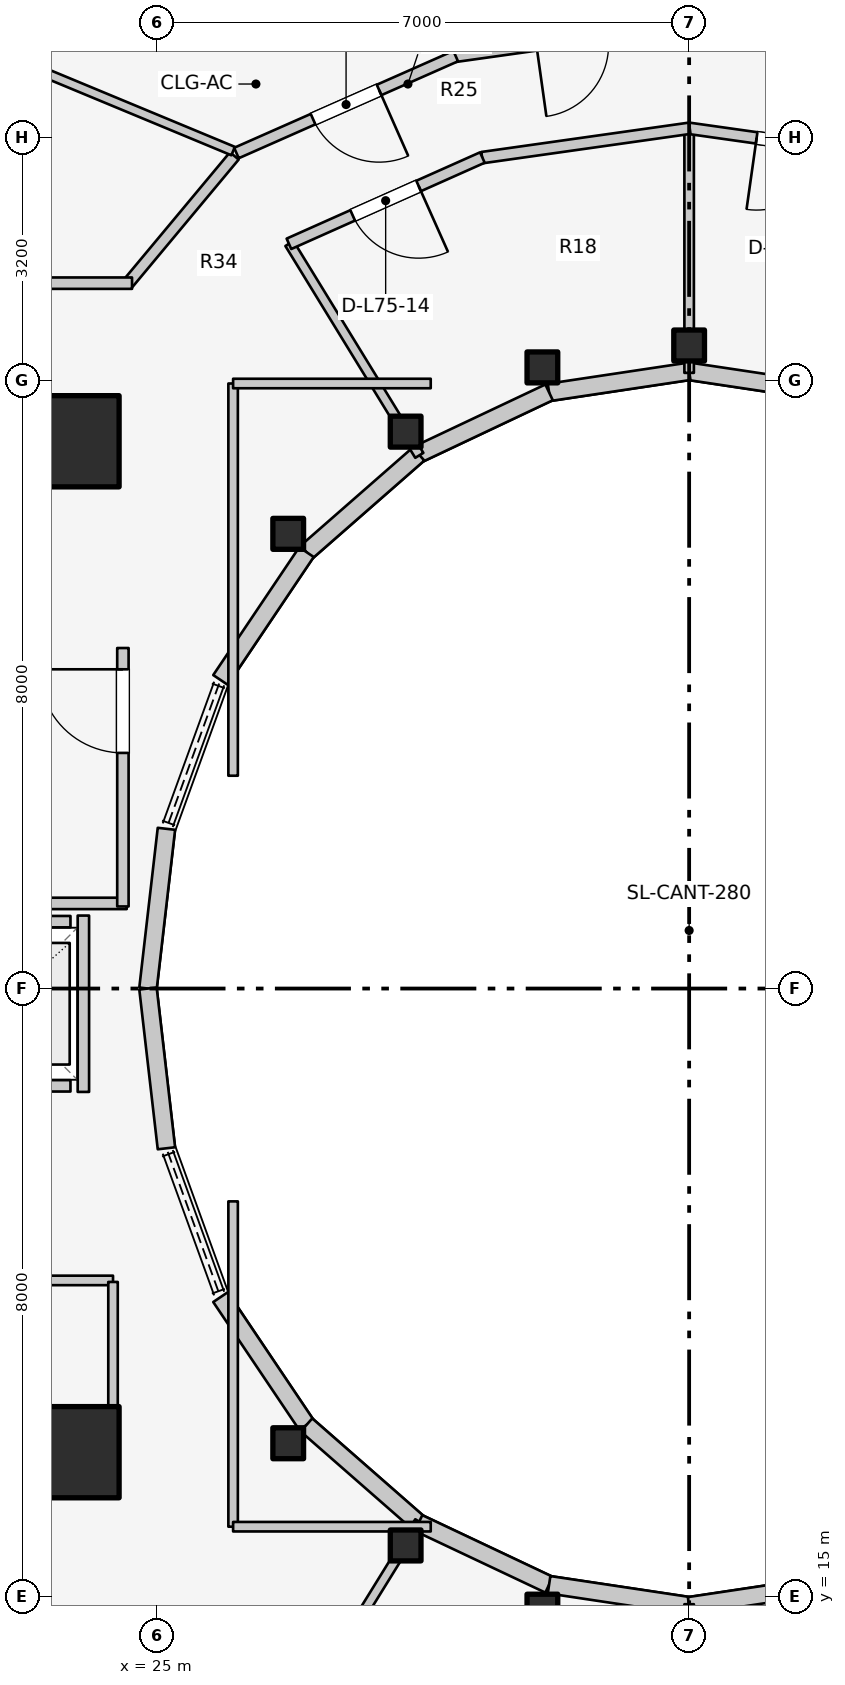
"""IFC4 building model, lengths in metres.
Left out: names, types, materials, properties, quantities, classifications, styles, units other than length and angle.
Written with IfcOpenShell. Run it as: python <this file> out.ifc"""

import sys

from ifc_helpers import new_model, si_unit, direction, frame, frame_2d, origin, origin_2d, place, context, subcontext, project, spatial, rectangle, i_section, extrude, element, fill, save


model = new_model("IFC4")
c1 = context("Model", 3, precision=1e-05, world=origin(), true_north=direction((0.0, 1.0)))
c2 = subcontext(c1, "Body", "Model", "MODEL_VIEW")
j1 = project(units=[si_unit("LENGTHUNIT", "METRE"), si_unit("PLANEANGLEUNIT", "RADIAN")], contexts=[c1])
p1 = place(None, origin())
s1 = spatial("IfcSite", under=j1, at=p1, CompositionType="ELEMENT")
p2 = place(p1, origin())
s2 = spatial("IfcBuilding", under=s1, at=p2, CompositionType="ELEMENT")
p3 = place(p2, frame((0.0, 0.0, 246.0)))
s3 = spatial("IfcBuildingStorey", under=s2, at=p3, CompositionType="ELEMENT", Elevation=246.0)
for number, where, z_axis, x_axis in (
    (1, (19.65, 16.55, 0.0), (0.0, 0.0, 1.0), (1.0, 0.0, 0.0)),
    (2, (19.65, 30.35, 0.0), (0.0, 0.0, 1.0), (1.0, 0.0, 0.0)),
):
    element("IfcWall", number, at=place(p3, frame(where, z_axis=z_axis, x_axis=x_axis)), inside=s3, PredefinedType="SHEAR", context=c2, shape_type="SweptSolid", body=[
        extrude(rectangle(XDim=4.5, YDim=0.45, at=frame_2d((2.25, 0.0))), origin(), (0.0, 0.0, 1.0), 3.6),
    ])
for number, where, z_axis, x_axis in (
    (3, (23.9, 16.9, 0.0), (0.0, 0.0, 1.0), (1.0, 0.0, 0.0)),
    (4, (23.9, 30.2, 0.0), (0.0, 0.0, 1.0), (1.0, 0.0, 0.0)),
):
    element("IfcColumn", number, at=place(p3, frame(where, z_axis=z_axis, x_axis=x_axis)), inside=s3, PredefinedType="COLUMN", context=c2, shape_type="SweptSolid", body=[
        extrude(rectangle(XDim=1.2, YDim=1.2, at=origin_2d()), origin(), (0.0, 0.0, 1.0), 3.6),
    ])
for number, where, z_axis, x_axis in (
    (5, (32.0, 31.46, 0.0), (0.0, 0.0, 1.0), (1.0, 0.0, 0.0)),
    (6, (30.069, 31.172, 0.0), (0.0, 0.0, 1.0), (1.0, 0.0, 0.0)),
    (7, (28.27, 30.327, 0.0), (0.0, 0.0, 1.0), (1.0, 0.0, 0.0)),
    (8, (26.725, 28.982, 0.0), (0.0, 0.0, 1.0), (1.0, 0.0, 0.0)),
    (9, (26.725, 17.018, 0.0), (0.0, 0.0, 1.0), (1.0, 0.0, 0.0)),
    (10, (28.27, 15.673, 0.0), (0.0, 0.0, 1.0), (1.0, 0.0, 0.0)),
    (11, (30.069, 14.828, 0.0), (0.0, 0.0, 1.0), (1.0, 0.0, 0.0)),
):
    element("IfcColumn", number, at=place(p3, frame(where, z_axis=z_axis, x_axis=x_axis)), inside=s3, PredefinedType="COLUMN", context=c2, shape_type="SweptSolid", body=[
        extrude(i_section(OverallWidth=0.404, OverallDepth=0.407, WebThickness=0.027, FlangeThickness=0.044, FilletRadius=0.025, at=origin_2d()), origin(), (0.0, 0.0, 1.0), 3.6),
    ])
for number, where, z_axis, x_axis in (
    (12, (33.843, 30.843, 0.0), (0.0, 0.0, 1.0), (-0.989, 0.149, 0.0)),
    (13, (32.0, 31.12, 0.0), (0.0, 0.0, 1.0), (-0.989, -0.149, 0.0)),
):
    element("IfcWall", number, at=place(p3, frame(where, z_axis=z_axis, x_axis=x_axis)), inside=s3, PredefinedType="STANDARD", context=c2, shape_type="SweptSolid", body=[
        extrude(rectangle(XDim=1.864, YDim=0.23, at=frame_2d((0.932, 0.0))), origin(), (0.0, 0.0, 1.0), 2.6),
    ])
p4 = place(p3, frame((30.157, 30.843, 0.0), z_axis=(0.0, 0.0, 1.0), x_axis=(-0.904179699603, -0.427152280606, 0.0)))
e14 = element("IfcWall", 14, at=p4, inside=s3, PredefinedType="STANDARD", context=c2, shape_type="SweptSolid", body=[
    extrude(rectangle(XDim=1.899, YDim=0.23, at=frame_2d((0.95, 0.0))), origin(), (0.0, 0.0, 1.0), 2.6),
])
p5 = place(p3, frame((28.44, 30.032, 0.0), z_axis=(0.0, 0.0, 1.0), x_axis=(-0.752576694707, -0.658504607869, 0.0)))
e15 = element("IfcWall", 15, at=p5, inside=s3, PredefinedType="STANDARD", context=c2, shape_type="SweptSolid", body=[
    extrude(rectangle(XDim=1.959, YDim=0.23, at=frame_2d((0.98, 0.0))), origin(), (0.0, 0.0, 1.0), 2.6),
])
p6 = place(p3, frame((26.965, 28.742, 0.0), z_axis=(0.0, 0.0, 1.0), x_axis=(-0.558197800898, -0.829707909492, 0.0)))
e16 = element("IfcWall", 16, at=p6, inside=s3, PredefinedType="STANDARD", context=c2, shape_type="SweptSolid", body=[
    extrude(rectangle(XDim=2.027, YDim=0.23, at=frame_2d((1.013, 0.0))), origin(), (0.0, 0.0, 1.0), 2.6),
])
for number, where, z_axis, x_axis in (
    (17, (25.123, 25.102, 0.0), (0.0, 0.0, 1.0), (-0.115, -0.993, 0.0)),
    (18, (24.88, 23.0, 0.0), (0.0, 0.0, 1.0), (0.115, -0.993, 0.0)),
):
    element("IfcWall", number, at=place(p3, frame(where, z_axis=z_axis, x_axis=x_axis)), inside=s3, PredefinedType="STANDARD", context=c2, shape_type="SweptSolid", body=[
        extrude(rectangle(XDim=2.115, YDim=0.23, at=frame_2d((1.058, 0.0))), origin(), (0.0, 0.0, 1.0), 3.28),
    ])
p7 = place(p3, frame((25.834, 18.94, 0.0), z_axis=(0.0, 0.0, 1.0), x_axis=(0.558197800898, -0.829707909492, 0.0)))
e19 = element("IfcWall", 19, at=p7, inside=s3, PredefinedType="STANDARD", context=c2, shape_type="SweptSolid", body=[
    extrude(rectangle(XDim=2.027, YDim=0.23, at=frame_2d((1.013, 0.0))), origin(), (0.0, 0.0, 1.0), 2.6),
])
p8 = place(p3, frame((26.965, 17.258, 0.0), z_axis=(0.0, 0.0, 1.0), x_axis=(0.752576694707, -0.658504607869, 0.0)))
e20 = element("IfcWall", 20, at=p8, inside=s3, PredefinedType="STANDARD", context=c2, shape_type="SweptSolid", body=[
    extrude(rectangle(XDim=1.959, YDim=0.23, at=frame_2d((0.98, 0.0))), origin(), (0.0, 0.0, 1.0), 2.6),
])
p9 = place(p3, frame((28.44, 15.968, 0.0), z_axis=(0.0, 0.0, 1.0), x_axis=(0.904179699603, -0.427152280606, 0.0)))
e21 = element("IfcWall", 21, at=p9, inside=s3, PredefinedType="STANDARD", context=c2, shape_type="SweptSolid", body=[
    extrude(rectangle(XDim=1.899, YDim=0.23, at=frame_2d((0.95, 0.0))), origin(), (0.0, 0.0, 1.0), 2.6),
])
for number, where, z_axis, x_axis in (
    (22, (30.157, 15.157, 0.0), (0.0, 0.0, 1.0), (0.989, -0.149, 0.0)),
    (23, (32.0, 14.88, 0.0), (0.0, 0.0, 1.0), (0.989, 0.149, 0.0)),
):
    element("IfcWall", number, at=place(p3, frame(where, z_axis=z_axis, x_axis=x_axis)), inside=s3, PredefinedType="STANDARD", context=c2, shape_type="SweptSolid", body=[
        extrude(rectangle(XDim=1.864, YDim=0.23, at=frame_2d((0.932, 0.0))), origin(), (0.0, 0.0, 1.0), 2.6),
    ])
p10 = place(p3, frame((22.04, 21.72, 0.0), z_axis=(0.0, 0.0, 1.0), x_axis=(1.0, 0.0, 0.0)))
e24 = element("IfcWall", 24, at=p10, inside=s3, PredefinedType="SOLIDWALL", context=c2, shape_type="SweptSolid", body=[
    extrude(rectangle(XDim=1.82, YDim=0.15, at=frame_2d((0.91, 0.0))), origin(), (0.0, 0.0, 1.0), 2.62),
])
p11 = place(p10, frame((0.36, 0.0, 0.0)))
e25 = element("IfcOpeningElement", 25, at=p11, cuts=e24, PredefinedType="OPENING", context=c2, shape_type="SweptSolid", body=[
    extrude(rectangle(XDim=1.1, YDim=2.1, at=frame_2d((0.55, 1.05))), frame((0.0, 0.085, 0.0), z_axis=(0.0, -1.0, 0.0), x_axis=(1.0, 0.0, 0.0)), (0.0, 0.0, 1.0), 0.17),
])
p12 = place(p3, frame((22.04, 23.88, 0.0), z_axis=(0.0, 0.0, 1.0), x_axis=(1.0, 0.0, 0.0)))
e26 = element("IfcWall", 26, at=p12, inside=s3, PredefinedType="SOLIDWALL", context=c2, shape_type="SweptSolid", body=[
    extrude(rectangle(XDim=1.82, YDim=0.15, at=frame_2d((0.91, 0.0))), origin(), (0.0, 0.0, 1.0), 2.62),
])
p13 = place(p3, frame((24.03, 21.64, 0.0), z_axis=(0.0, 0.0, 1.0), x_axis=(0.0, 1.0, 0.0)))
e27 = element("IfcWall", 27, at=p13, inside=s3, PredefinedType="SOLIDWALL", context=c2, shape_type="SweptSolid", body=[
    extrude(rectangle(XDim=2.32, YDim=0.15, at=frame_2d((1.16, 0.0))), origin(), (0.0, 0.0, 1.0), 2.62),
])
p14 = place(p3, frame((19.52, 24.12, 0.0), z_axis=(0.0, 0.0, 1.0), x_axis=(1.0, 0.0, 0.0)))
e28 = element("IfcWall", 28, at=p14, inside=s3, PredefinedType="PARTITIONING", context=c2, shape_type="SweptSolid", body=[
    extrude(rectangle(XDim=5.08, YDim=0.15, at=frame_2d((2.54, 0.0))), origin(), (0.0, 0.0, 1.0), 2.62),
])
p15 = place(p3, frame((24.55, 24.08, 0.0), z_axis=(0.0, 0.0, 1.0), x_axis=(0.0, 1.0, 0.0)))
e29 = element("IfcWall", 29, at=p15, inside=s3, PredefinedType="PARTITIONING", context=c2, shape_type="SweptSolid", body=[
    extrude(rectangle(XDim=3.4, YDim=0.15, at=frame_2d((1.7, 0.0))), origin(), (0.0, 0.0, 1.0), 3.295),
])
p16 = place(p15, frame((2.02, 0.0, 0.0)))
e30 = element("IfcOpeningElement", 30, at=p16, cuts=e29, PredefinedType="OPENING", context=c2, shape_type="SweptSolid", body=[
    extrude(rectangle(XDim=1.1, YDim=2.1, at=frame_2d((0.55, 1.05))), frame((0.0, 0.085, 0.0), z_axis=(0.0, -1.0, 0.0), x_axis=(1.0, 0.0, 0.0)), (0.0, 0.0, 1.0), 0.17),
])
p17 = place(p3, frame((19.55, 19.16, 0.0), z_axis=(0.0, 0.0, 1.0), x_axis=(1.0, 0.0, 0.0)))
e31 = element("IfcWall", 31, at=p17, inside=s3, PredefinedType="PARTITIONING", context=c2, shape_type="SweptSolid", body=[
    extrude(rectangle(XDim=4.87, YDim=0.125, at=frame_2d((2.435, 0.0))), origin(), (0.0, 0.0, 1.0), 2.62),
])
p18 = place(p17, frame((2.272, 0.0, 0.0)))
e32 = element("IfcOpeningElement", 32, at=p18, cuts=e31, PredefinedType="OPENING", context=c2, shape_type="SweptSolid", body=[
    extrude(rectangle(XDim=0.85, YDim=2.05, at=frame_2d((0.425, 1.025))), frame((0.0, 0.073, 0.0), z_axis=(0.0, -1.0, 0.0), x_axis=(1.0, 0.0, 0.0)), (0.0, 0.0, 1.0), 0.145),
])
p19 = place(p3, frame((24.42, 17.1, 0.0), z_axis=(0.0, 0.0, 1.0), x_axis=(0.0, 1.0, 0.0)))
e33 = element("IfcWall", 33, at=p19, inside=s3, PredefinedType="PARTITIONING", context=c2, shape_type="SweptSolid", body=[
    extrude(rectangle(XDim=2.04, YDim=0.125, at=frame_2d((1.02, 0.0))), origin(), (0.0, 0.0, 1.0), 2.672),
])
p20 = place(p3, frame((32.0, 31.1, 0.0), z_axis=(0.0, 0.0, 1.0), x_axis=(0.0, 1.0, 0.0)))
e34 = element("IfcWall", 34, at=p20, inside=s3, PredefinedType="PARTITIONING", context=c2, shape_type="SweptSolid", body=[
    extrude(rectangle(XDim=3.218, YDim=0.125, at=frame_2d((1.609, 0.0))), origin(), (0.0, 0.0, 1.0), 2.672),
])
p21 = place(p3, frame((28.45, 30.015, 0.0), z_axis=(0.0, 0.0, 1.0), x_axis=(-0.522763432117, 0.852477796802, 0.0)))
e35 = element("IfcWall", 35, at=p21, inside=s3, PredefinedType="PARTITIONING", context=c2, shape_type="SweptSolid", body=[
    extrude(rectangle(XDim=3.269, YDim=0.125, at=frame_2d((1.635, 0.0))), origin(), (0.0, 0.0, 1.0), 2.672),
])
p22 = place(p3, frame((34.724, 33.932, 0.0), z_axis=(0.0, 0.0, 1.0), x_axis=(-0.990150268487, 0.140008734782, 0.0)))
e36 = element("IfcWall", 36, at=p22, inside=s3, PredefinedType="PARTITIONING", context=c2, shape_type="SweptSolid", body=[
    extrude(rectangle(XDim=2.759, YDim=0.15, at=frame_2d((1.379, 0.0))), origin(), (0.0, 0.0, 1.0), 2.823),
])
p23 = place(p22, frame((0.904, 0.0, 0.0)))
e37 = element("IfcOpeningElement", 37, at=p23, cuts=e36, PredefinedType="OPENING", context=c2, shape_type="SweptSolid", body=[
    extrude(rectangle(XDim=0.95, YDim=2.1, at=frame_2d((0.475, 1.05))), frame((0.0, 0.085, 0.0), z_axis=(0.0, -1.0, 0.0), x_axis=(1.0, 0.0, 0.0)), (0.0, 0.0, 1.0), 0.17),
])
p24 = place(p3, frame((32.007, 34.318, 0.0), z_axis=(0.0, 0.0, 1.0), x_axis=(-0.990150268487, -0.140008734782, 0.0)))
e38 = element("IfcWall", 38, at=p24, inside=s3, PredefinedType="PARTITIONING", context=c2, shape_type="SweptSolid", body=[
    extrude(rectangle(XDim=2.759, YDim=0.15, at=frame_2d((1.379, 0.0))), origin(), (0.0, 0.0, 1.0), 2.823),
])
p25 = place(p3, frame((29.28, 33.933, 0.0), z_axis=(0.0, 0.0, 1.0), x_axis=(-0.913254317828, -0.407389924971, 0.0)))
e39 = element("IfcWall", 39, at=p25, inside=s3, PredefinedType="PARTITIONING", context=c2, shape_type="SweptSolid", body=[
    extrude(rectangle(XDim=2.787, YDim=0.15, at=frame_2d((1.393, 0.0))), origin(), (0.0, 0.0, 1.0), 2.823),
])
p26 = place(p25, frame((0.918, 0.0, 0.0)))
e40 = element("IfcOpeningElement", 40, at=p26, cuts=e39, PredefinedType="OPENING", context=c2, shape_type="SweptSolid", body=[
    extrude(rectangle(XDim=0.95, YDim=2.1, at=frame_2d((0.475, 1.05))), frame((0.0, 0.085, 0.0), z_axis=(0.0, -1.0, 0.0), x_axis=(1.0, 0.0, 0.0)), (0.0, 0.0, 1.0), 0.17),
])
p27 = place(p3, frame((28.45, 15.985, 0.0), z_axis=(0.0, 0.0, 1.0), x_axis=(-0.52592395012, -0.850531597702, 0.0)))
e41 = element("IfcWall", 41, at=p27, inside=s3, PredefinedType="PARTITIONING", context=c2, shape_type="SweptSolid", body=[
    extrude(rectangle(XDim=2.869, YDim=0.125, at=frame_2d((1.435, 0.0))), origin(), (0.0, 0.0, 1.0), 2.672),
])
p28 = place(p3, frame((32.0, 14.9, 0.0), z_axis=(0.0, 0.0, 1.0), x_axis=(0.0, -1.0, 0.0)))
e42 = element("IfcWall", 42, at=p28, inside=s3, PredefinedType="PARTITIONING", context=c2, shape_type="SweptSolid", body=[
    extrude(rectangle(XDim=2.818, YDim=0.125, at=frame_2d((1.409, 0.0))), origin(), (0.0, 0.0, 1.0), 2.672),
])
p29 = place(p3, frame((26.0, 25.8, 0.0), z_axis=(0.0, 0.0, 1.0), x_axis=(0.0, 1.0, 0.0)))
e43 = element("IfcWall", 43, at=p29, inside=s3, PredefinedType="PARTITIONING", context=c2, shape_type="SweptSolid", body=[
    extrude(rectangle(XDim=5.16, YDim=0.125, at=frame_2d((2.58, 0.0))), origin(), (0.0, 0.0, 1.0), 2.672),
])
p30 = place(p3, frame((26.0, 30.96, 0.0), z_axis=(0.0, 0.0, 1.0), x_axis=(1.0, 0.0, 0.0)))
e44 = element("IfcWall", 44, at=p30, inside=s3, PredefinedType="PARTITIONING", context=c2, shape_type="SweptSolid", body=[
    extrude(rectangle(XDim=2.6, YDim=0.125, at=frame_2d((1.3, 0.0))), origin(), (0.0, 0.0, 1.0), 2.816),
])
p31 = place(p3, frame((26.0, 15.92, 0.0), z_axis=(0.0, 0.0, 1.0), x_axis=(0.0, 1.0, 0.0)))
e45 = element("IfcWall", 45, at=p31, inside=s3, PredefinedType="PARTITIONING", context=c2, shape_type="SweptSolid", body=[
    extrude(rectangle(XDim=4.28, YDim=0.125, at=frame_2d((2.14, 0.0))), origin(), (0.0, 0.0, 1.0), 2.672),
])
p32 = place(p3, frame((26.0, 15.92, 0.0), z_axis=(0.0, 0.0, 1.0), x_axis=(1.0, 0.0, 0.0)))
e46 = element("IfcWall", 46, at=p32, inside=s3, PredefinedType="PARTITIONING", context=c2, shape_type="SweptSolid", body=[
    extrude(rectangle(XDim=2.6, YDim=0.125, at=frame_2d((1.3, 0.0))), origin(), (0.0, 0.0, 1.0), 2.672),
])
p33 = place(p3, frame((26.016, 33.955, 0.0), z_axis=(0.0, 0.0, 1.0), x_axis=(-0.64030392053, -0.76812166312, 0.0)))
e47 = element("IfcWall", 47, at=p33, inside=s3, PredefinedType="PARTITIONING", context=c2, shape_type="SweptSolid", body=[
    extrude(rectangle(XDim=2.21, YDim=0.15, at=frame_2d((1.105, 0.0))), origin(), (0.0, 0.0, 1.0), 2.816),
])
p34 = place(p3, frame((17.15, 32.28, 0.0), z_axis=(0.0, 0.0, 1.0), x_axis=(1.0, 0.0, 0.0)))
e48 = element("IfcWall", 48, at=p34, inside=s3, PredefinedType="PARTITIONING", context=c2, shape_type="SweptSolid", body=[
    extrude(rectangle(XDim=7.52, YDim=0.15, at=frame_2d((3.76, 0.0))), origin(), (0.0, 0.0, 1.0), 2.816),
])
p35 = place(p34, frame((1.3, 0.0, 0.0)))
e49 = element("IfcOpeningElement", 49, at=p35, cuts=e48, PredefinedType="OPENING", context=c2, shape_type="SweptSolid", body=[
    extrude(rectangle(XDim=0.9, YDim=2.1, at=frame_2d((0.45, 1.05))), frame((0.0, 0.085, 0.0), z_axis=(0.0, -1.0, 0.0), x_axis=(1.0, 0.0, 0.0)), (0.0, 0.0, 1.0), 0.17),
])
p36 = place(p3, frame((28.876, 35.297, 0.0), z_axis=(0.0, 0.0, 1.0), x_axis=(-0.811745719064, 0.584011033783, 0.0)))
e50 = element("IfcWall", 50, at=p36, inside=s3, PredefinedType="MOVABLE", context=c2, shape_type="SweptSolid", body=[
    extrude(rectangle(XDim=4.534, YDim=0.12, at=frame_2d((2.267, 0.0))), origin(), (0.0, 0.0, 1.0), 2.66),
])
p37 = place(p3, frame((26.0, 34.018, 0.0), z_axis=(0.0, 0.0, 1.0), x_axis=(-0.92349333748, 0.383614462228, 0.0)))
e51 = element("IfcWall", 51, at=p37, inside=s3, PredefinedType="MOVABLE", context=c2, shape_type="SweptSolid", body=[
    extrude(rectangle(XDim=5.907, YDim=0.12, at=frame_2d((2.954, 0.0))), origin(), (0.0, 0.0, 1.0), 2.66),
])
p38 = place(p3, frame((35.087, 35.263, 0.0), z_axis=(0.0, 0.0, 1.0), x_axis=(-0.990268690673, 0.139168675614, 0.0)))
e52 = element("IfcWall", 52, at=p38, inside=s3, PredefinedType="PARTITIONING", context=c2, shape_type="SweptSolid", body=[
    extrude(rectangle(XDim=3.126, YDim=0.15, at=frame_2d((1.563, 0.0))), origin(), (0.0, 0.0, 1.0), 2.823),
])
p39 = place(p38, frame((1.088, 0.0, 0.0)))
e53 = element("IfcOpeningElement", 53, at=p39, cuts=e52, PredefinedType="OPENING", context=c2, shape_type="SweptSolid", body=[
    extrude(rectangle(XDim=0.95, YDim=2.1, at=frame_2d((0.475, 1.05))), frame((0.0, 0.085, 0.0), z_axis=(0.0, -1.0, 0.0), x_axis=(1.0, 0.0, 0.0)), (0.0, 0.0, 1.0), 0.17),
])
p40 = place(p3, frame((32.008, 35.698, 0.0), z_axis=(0.0, 0.0, 1.0), x_axis=(-0.990268690673, -0.139168675614, 0.0)))
e54 = element("IfcWall", 54, at=p40, inside=s3, PredefinedType="PARTITIONING", context=c2, shape_type="SweptSolid", body=[
    extrude(rectangle(XDim=3.126, YDim=0.15, at=frame_2d((1.563, 0.0))), origin(), (0.0, 0.0, 1.0), 2.823),
])
p41 = place(p40, frame((1.088, 0.0, 0.0)))
e55 = element("IfcOpeningElement", 55, at=p41, cuts=e54, PredefinedType="OPENING", context=c2, shape_type="SweptSolid", body=[
    extrude(rectangle(XDim=0.95, YDim=2.1, at=frame_2d((0.475, 1.05))), frame((0.0, 0.085, 0.0), z_axis=(0.0, -1.0, 0.0), x_axis=(1.0, 0.0, 0.0)), (0.0, 0.0, 1.0), 0.17),
])
p42 = place(p3, frame((28.929, 35.268, 0.0), z_axis=(0.0, 0.0, 1.0), x_axis=(-0.914642679993, -0.404263240891, 0.0)))
e56 = element("IfcWall", 56, at=p42, inside=s3, PredefinedType="PARTITIONING", context=c2, shape_type="SweptSolid", body=[
    extrude(rectangle(XDim=3.154, YDim=0.15, at=frame_2d((1.577, 0.0))), origin(), (0.0, 0.0, 1.0), 2.823),
])
p43 = place(p42, frame((1.102, 0.0, 0.0)))
e57 = element("IfcOpeningElement", 57, at=p43, cuts=e56, PredefinedType="OPENING", context=c2, shape_type="SweptSolid", body=[
    extrude(rectangle(XDim=0.95, YDim=2.1, at=frame_2d((0.475, 1.05))), frame((0.0, 0.085, 0.0), z_axis=(0.0, -1.0, 0.0), x_axis=(1.0, 0.0, 0.0)), (0.0, 0.0, 1.0), 0.17),
])
p44 = place(p16, origin())
e58 = element("IfcDoor", 58, at=p44, inside=s3, OperationType="SINGLE_SWING_RIGHT", PredefinedType="DOOR", context=c2, shape_type="SweptSolid", body=[
    extrude(rectangle(XDim=1.1, YDim=2.1, at=frame_2d((0.55, 1.05))), frame((0.0, 0.025, 0.0), z_axis=(0.0, -1.0, 0.0), x_axis=(1.0, 0.0, 0.0)), (0.0, 0.0, 1.0), 0.05),
])
fill(e30, e58)
p45 = place(p23, origin())
e59 = element("IfcDoor", 59, at=p45, inside=s3, OperationType="SINGLE_SWING_RIGHT", PredefinedType="DOOR", context=c2, shape_type="SweptSolid", body=[
    extrude(rectangle(XDim=0.95, YDim=2.1, at=frame_2d((0.475, 1.05))), frame((0.0, 0.025, 0.0), z_axis=(0.0, -1.0, 0.0), x_axis=(1.0, 0.0, 0.0)), (0.0, 0.0, 1.0), 0.05),
])
fill(e37, e59)
p46 = place(p26, origin())
e60 = element("IfcDoor", 60, at=p46, inside=s3, OperationType="SINGLE_SWING_LEFT", PredefinedType="DOOR", context=c2, shape_type="SweptSolid", body=[
    extrude(rectangle(XDim=0.95, YDim=2.1, at=frame_2d((0.475, 1.05))), frame((0.0, 0.025, 0.0), z_axis=(0.0, -1.0, 0.0), x_axis=(1.0, 0.0, 0.0)), (0.0, 0.0, 1.0), 0.05),
])
fill(e40, e60)
p47 = place(p43, origin())
e61 = element("IfcDoor", 61, at=p47, inside=s3, OperationType="SINGLE_SWING_LEFT", PredefinedType="DOOR", context=c2, shape_type="SweptSolid", body=[
    extrude(rectangle(XDim=0.95, YDim=2.1, at=frame_2d((0.475, 1.05))), frame((0.0, 0.025, 0.0), z_axis=(0.0, -1.0, 0.0), x_axis=(1.0, 0.0, 0.0)), (0.0, 0.0, 1.0), 0.05),
])
fill(e57, e61)
save(model, sys.argv[1])
